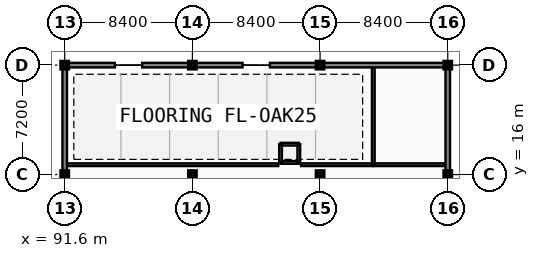
"""IFC4 building model, lengths in metres.
Left out: names, types, materials, properties, quantities, classifications, styles, units other than length and angle.
Written with IfcOpenShell. Run it as: python <this file> out.ifc"""

import sys

from ifc_helpers import new_model, si_unit, direction, frame, frame_2d, origin, origin_2d, place, context, subcontext, project, spatial, rectangle, extrude, element, fill, save


model = new_model("IFC4")
c1 = context("Model", 3, precision=1e-05, world=origin(), true_north=direction((0.0, 1.0)))
c2 = subcontext(c1, "Body", "Model", "MODEL_VIEW")
j1 = project(units=[si_unit("LENGTHUNIT", "METRE"), si_unit("PLANEANGLEUNIT", "RADIAN")], contexts=[c1])
p1 = place(None, origin())
s1 = spatial("IfcSite", under=j1, at=p1, CompositionType="ELEMENT")
p2 = place(p1, origin())
s2 = spatial("IfcBuilding", under=s1, at=p2, CompositionType="ELEMENT")
p3 = place(p2, frame((0.0, 0.0, 13.8)))
s3 = spatial("IfcBuildingStorey", under=s2, at=p3, CompositionType="ELEMENT", Elevation=13.8)
for number, where, z_axis, x_axis in (
    (1, (91.6, 16.0, 0.0), (0.0, 0.0, 1.0), (1.0, 0.0, 0.0)),
    (2, (91.6, 23.2, 0.0), (0.0, 0.0, 1.0), (1.0, 0.0, 0.0)),
    (3, (100.0, 16.0, 0.0), (0.0, 0.0, 1.0), (1.0, 0.0, 0.0)),
    (4, (100.0, 23.2, 0.0), (0.0, 0.0, 1.0), (1.0, 0.0, 0.0)),
    (5, (108.4, 16.0, 0.0), (0.0, 0.0, 1.0), (1.0, 0.0, 0.0)),
    (6, (108.4, 23.2, 0.0), (0.0, 0.0, 1.0), (1.0, 0.0, 0.0)),
    (7, (116.8, 16.0, 0.0), (0.0, 0.0, 1.0), (1.0, 0.0, 0.0)),
    (8, (116.8, 23.2, 0.0), (0.0, 0.0, 1.0), (1.0, 0.0, 0.0)),
):
    element("IfcColumn", number, at=place(p3, frame(where, z_axis=z_axis, x_axis=x_axis)), inside=s3, PredefinedType="COLUMN", context=c2, shape_type="SweptSolid", body=[
        extrude(rectangle(XDim=0.4, YDim=0.4, at=origin_2d()), origin(), (0.0, 0.0, 1.0), 3.9),
    ])
p4 = place(p3, frame((91.74, 16.65, 0.0), z_axis=(0.0, 0.0, 1.0), x_axis=(1.0, 0.0, 0.0)))
e9 = element("IfcWall", 9, at=p4, inside=s3, PredefinedType="PARTITIONING", context=c2, shape_type="SweptSolid", body=[
    extrude(rectangle(XDim=13.91, YDim=0.18, at=frame_2d((6.955, 0.0))), origin(), (0.0, 0.0, 1.0), 3.09),
])
p5 = place(p4, frame((5.54, 0.0, -0.01)))
e10 = element("IfcOpeningElement", 10, at=p5, cuts=e9, PredefinedType="OPENING", context=c2, shape_type="SweptSolid", body=[
    extrude(rectangle(XDim=1.6, YDim=2.21, at=frame_2d((0.8, 1.105))), frame((0.0, 0.1, 0.0), z_axis=(0.0, -1.0, 0.0), x_axis=(1.0, 0.0, 0.0)), (0.0, 0.0, 1.0), 0.2),
])
p6 = place(p3, frame((107.15, 16.65, 0.0), z_axis=(0.0, 0.0, 1.0), x_axis=(1.0, 0.0, 0.0)))
e11 = element("IfcWall", 11, at=p6, inside=s3, PredefinedType="PARTITIONING", context=c2, shape_type="SweptSolid", body=[
    extrude(rectangle(XDim=4.75, YDim=0.18, at=frame_2d((2.375, 0.0))), origin(), (0.0, 0.0, 1.0), 3.09),
])
p7 = place(p3, frame((111.9, 16.65, 0.0), z_axis=(0.0, 0.0, 1.0), x_axis=(1.0, 0.0, 0.0)))
e12 = element("IfcWall", 12, at=p7, inside=s3, PredefinedType="PARTITIONING", context=c2, shape_type="SweptSolid", body=[
    extrude(rectangle(XDim=4.76, YDim=0.18, at=frame_2d((2.38, 0.0))), origin(), (0.0, 0.0, 1.0), 3.09),
])
p8 = place(p7, frame((1.88, 0.0, -0.01)))
e13 = element("IfcOpeningElement", 13, at=p8, cuts=e12, PredefinedType="OPENING", context=c2, shape_type="SweptSolid", body=[
    extrude(rectangle(XDim=1.0, YDim=2.16, at=frame_2d((0.5, 1.08))), frame((0.0, 0.1, 0.0), z_axis=(0.0, -1.0, 0.0), x_axis=(1.0, 0.0, 0.0)), (0.0, 0.0, 1.0), 0.2),
])
p9 = place(p3, frame((111.9, 16.65, 0.0), z_axis=(0.0, 0.0, 1.0), x_axis=(0.0, 1.0, 0.0)))
e14 = element("IfcWall", 14, at=p9, inside=s3, PredefinedType="PARTITIONING", context=c2, shape_type="SweptSolid", body=[
    extrude(rectangle(XDim=6.41, YDim=0.18, at=frame_2d((3.205, 0.0))), origin(), (0.0, 0.0, 1.0), 3.01),
])
p10 = place(p3, frame((100.0, 23.2, 0.0), z_axis=(0.0, 0.0, 1.0), x_axis=(-1.0, 0.0, 0.0)))
e15 = element("IfcWall", 15, at=p10, inside=s3, PredefinedType="SOLIDWALL", context=c2, shape_type="SweptSolid", body=[
    extrude(rectangle(XDim=3.3, YDim=0.3, at=frame_2d((1.65, 0.0))), origin(), (0.0, 0.0, 1.0), 3.01),
])
for number, where, z_axis, x_axis in (
    (16, (94.9, 23.2, 0.0), (0.0, 0.0, 1.0), (-1.0, 0.0, 0.0)),
    (17, (108.4, 23.2, 0.0), (0.0, 0.0, 1.0), (-1.0, 0.0, 0.0)),
):
    element("IfcWall", number, at=place(p3, frame(where, z_axis=z_axis, x_axis=x_axis)), inside=s3, PredefinedType="SOLIDWALL", context=c2, shape_type="SweptSolid", body=[
        extrude(rectangle(XDim=3.3, YDim=0.3, at=frame_2d((1.65, 0.0))), origin(), (0.0, 0.0, 1.0), 3.01),
    ])
p11 = place(p3, frame((103.3, 23.2, 0.0), z_axis=(0.0, 0.0, 1.0), x_axis=(-1.0, 0.0, 0.0)))
e18 = element("IfcWall", 18, at=p11, inside=s3, PredefinedType="SOLIDWALL", context=c2, shape_type="SweptSolid", body=[
    extrude(rectangle(XDim=3.3, YDim=0.3, at=frame_2d((1.65, 0.0))), origin(), (0.0, 0.0, 1.0), 3.01),
])
p12 = place(p3, frame((116.8, 23.2, 0.0), z_axis=(0.0, 0.0, 1.0), x_axis=(-1.0, 0.0, 0.0)))
e19 = element("IfcWall", 19, at=p12, inside=s3, PredefinedType="SOLIDWALL", context=c2, shape_type="SweptSolid", body=[
    extrude(rectangle(XDim=8.4, YDim=0.3, at=frame_2d((4.2, 0.0))), origin(), (0.0, 0.0, 1.0), 3.01),
])
p13 = place(p12, frame((0.46, 0.0, 0.85)))
e20 = element("IfcOpeningElement", 20, at=p13, cuts=e19, PredefinedType="OPENING", context=c2, shape_type="SweptSolid", body=[
    extrude(rectangle(XDim=0.9, YDim=2.02, at=frame_2d((0.45, 1.01))), frame((0.0, 0.16, 0.0), z_axis=(0.0, -1.0, 0.0), x_axis=(1.0, 0.0, 0.0)), (0.0, 0.0, 1.0), 0.32),
])
p14 = place(p12, frame((6.86, 0.0, 0.85)))
e21 = element("IfcOpeningElement", 21, at=p14, cuts=e19, PredefinedType="OPENING", context=c2, shape_type="SweptSolid", body=[
    extrude(rectangle(XDim=0.9, YDim=2.02, at=frame_2d((0.45, 1.01))), frame((0.0, 0.16, 0.0), z_axis=(0.0, -1.0, 0.0), x_axis=(1.0, 0.0, 0.0)), (0.0, 0.0, 1.0), 0.32),
])
p15 = place(p3, frame((91.6, 16.0, 0.0), z_axis=(0.0, 0.0, 1.0), x_axis=(0.0, -1.0, 0.0)))
e22 = element("IfcWall", 22, at=p15, inside=s3, PredefinedType="SOLIDWALL", context=c2, shape_type="SweptSolid", body=[
    extrude(rectangle(XDim=2.7, YDim=0.3, at=frame_2d((1.35, 0.0))), origin(), (0.0, 0.0, 1.0), 3.01),
])
p16 = place(p3, frame((91.6, 23.2, 0.0), z_axis=(0.0, 0.0, 1.0), x_axis=(0.0, -1.0, 0.0)))
e23 = element("IfcWall", 23, at=p16, inside=s3, PredefinedType="SOLIDWALL", context=c2, shape_type="SweptSolid", body=[
    extrude(rectangle(XDim=7.2, YDim=0.3, at=frame_2d((3.6, 0.0))), origin(), (0.0, 0.0, 1.0), 3.01),
])
p17 = place(p16, frame((0.46, 0.0, 0.85)))
e24 = element("IfcOpeningElement", 24, at=p17, cuts=e23, PredefinedType="OPENING", context=c2, shape_type="SweptSolid", body=[
    extrude(rectangle(XDim=0.9, YDim=2.02, at=frame_2d((0.45, 1.01))), frame((0.0, 0.16, 0.0), z_axis=(0.0, -1.0, 0.0), x_axis=(1.0, 0.0, 0.0)), (0.0, 0.0, 1.0), 0.32),
])
p18 = place(p16, frame((5.26, 0.0, 0.85)))
e25 = element("IfcOpeningElement", 25, at=p18, cuts=e23, PredefinedType="OPENING", context=c2, shape_type="SweptSolid", body=[
    extrude(rectangle(XDim=0.9, YDim=2.02, at=frame_2d((0.45, 1.01))), frame((0.0, 0.16, 0.0), z_axis=(0.0, -1.0, 0.0), x_axis=(1.0, 0.0, 0.0)), (0.0, 0.0, 1.0), 0.32),
])
p19 = place(p3, frame((116.8, 8.8, 0.0), z_axis=(0.0, 0.0, 1.0), x_axis=(0.0, 1.0, 0.0)))
e26 = element("IfcWall", 26, at=p19, inside=s3, PredefinedType="SOLIDWALL", context=c2, shape_type="SweptSolid", body=[
    extrude(rectangle(XDim=7.2, YDim=0.3, at=frame_2d((3.6, 0.0))), origin(), (0.0, 0.0, 1.0), 3.01),
])
p20 = place(p19, frame((0.46, 0.0, 0.85)))
e27 = element("IfcOpeningElement", 27, at=p20, cuts=e26, PredefinedType="OPENING", context=c2, shape_type="SweptSolid", body=[
    extrude(rectangle(XDim=0.9, YDim=2.02, at=frame_2d((0.45, 1.01))), frame((0.0, 0.16, 0.0), z_axis=(0.0, -1.0, 0.0), x_axis=(1.0, 0.0, 0.0)), (0.0, 0.0, 1.0), 0.32),
])
p21 = place(p19, frame((5.66, 0.0, 0.85)))
e28 = element("IfcOpeningElement", 28, at=p21, cuts=e26, PredefinedType="OPENING", context=c2, shape_type="SweptSolid", body=[
    extrude(rectangle(XDim=0.9, YDim=2.02, at=frame_2d((0.45, 1.01))), frame((0.0, 0.16, 0.0), z_axis=(0.0, -1.0, 0.0), x_axis=(1.0, 0.0, 0.0)), (0.0, 0.0, 1.0), 0.32),
])
p22 = place(p3, frame((116.8, 16.0, 0.0), z_axis=(0.0, 0.0, 1.0), x_axis=(0.0, 1.0, 0.0)))
e29 = element("IfcWall", 29, at=p22, inside=s3, PredefinedType="SOLIDWALL", context=c2, shape_type="SweptSolid", body=[
    extrude(rectangle(XDim=7.2, YDim=0.3, at=frame_2d((3.6, 0.0))), origin(), (0.0, 0.0, 1.0), 3.01),
])
p23 = place(p22, frame((0.86, 0.0, 0.85)))
e30 = element("IfcOpeningElement", 30, at=p23, cuts=e29, PredefinedType="OPENING", context=c2, shape_type="SweptSolid", body=[
    extrude(rectangle(XDim=0.9, YDim=2.02, at=frame_2d((0.45, 1.01))), frame((0.0, 0.16, 0.0), z_axis=(0.0, -1.0, 0.0), x_axis=(1.0, 0.0, 0.0)), (0.0, 0.0, 1.0), 0.32),
])
p24 = place(p22, frame((5.66, 0.0, 0.85)))
e31 = element("IfcOpeningElement", 31, at=p24, cuts=e29, PredefinedType="OPENING", context=c2, shape_type="SweptSolid", body=[
    extrude(rectangle(XDim=0.9, YDim=2.02, at=frame_2d((0.45, 1.01))), frame((0.0, 0.16, 0.0), z_axis=(0.0, -1.0, 0.0), x_axis=(1.0, 0.0, 0.0)), (0.0, 0.0, 1.0), 0.32),
])
p25 = place(p3, frame((105.8, 16.8, 0.0), z_axis=(0.0, 0.0, 1.0), x_axis=(1.0, 0.0, 0.0)))
e32 = element("IfcWall", 32, at=p25, inside=s3, PredefinedType="SOLIDWALL", context=c2, shape_type="SweptSolid", body=[
    extrude(rectangle(XDim=1.2, YDim=0.18, at=frame_2d((0.6, 0.0))), origin(), (0.0, 0.0, 1.0), 3.69),
])
p26 = place(p25, frame((0.2, 0.0, -0.01)))
e33 = element("IfcOpeningElement", 33, at=p26, cuts=e32, PredefinedType="OPENING", context=c2, shape_type="SweptSolid", body=[
    extrude(rectangle(XDim=0.8, YDim=2.06, at=frame_2d((0.4, 1.03))), frame((0.0, 0.1, 0.0), z_axis=(0.0, -1.0, 0.0), x_axis=(1.0, 0.0, 0.0)), (0.0, 0.0, 1.0), 0.2),
])
for number, where, z_axis, x_axis in (
    (34, (107.0, 16.8, 0.0), (0.0, 0.0, 1.0), (0.0, 1.0, 0.0)),
    (35, (107.0, 18.0, 0.0), (0.0, 0.0, 1.0), (-1.0, 0.0, 0.0)),
    (36, (105.8, 18.0, 0.0), (0.0, 0.0, 1.0), (0.0, -1.0, 0.0)),
):
    element("IfcWall", number, at=place(p3, frame(where, z_axis=z_axis, x_axis=x_axis)), inside=s3, PredefinedType="SOLIDWALL", context=c2, shape_type="SweptSolid", body=[
        extrude(rectangle(XDim=1.2, YDim=0.18, at=frame_2d((0.6, 0.0))), origin(), (0.0, 0.0, 1.0), 3.69),
    ])
p27 = place(p5, frame((0.0, 0.0, 0.01)))
e37 = element("IfcDoor", 37, at=p27, inside=s3, OperationType="DOUBLE_SWING_LEFT", PredefinedType="DOOR", context=c2, shape_type="SweptSolid", body=[
    extrude(rectangle(XDim=1.6, YDim=2.2, at=frame_2d((0.8, 1.1))), frame((0.0, 0.025, 0.0), z_axis=(0.0, -1.0, 0.0), x_axis=(1.0, 0.0, 0.0)), (0.0, 0.0, 1.0), 0.05),
])
fill(e10, e37)
p28 = place(p8, frame((0.0, 0.0, 0.01)))
e38 = element("IfcDoor", 38, at=p28, inside=s3, OperationType="SINGLE_SWING_LEFT", PredefinedType="DOOR", context=c2, shape_type="SweptSolid", body=[
    extrude(rectangle(XDim=1.0, YDim=2.15, at=frame_2d((0.5, 1.075))), frame((0.0, 0.025, 0.0), z_axis=(0.0, -1.0, 0.0), x_axis=(1.0, 0.0, 0.0)), (0.0, 0.0, 1.0), 0.05),
])
fill(e13, e38)
p29 = place(p13, origin())
e39 = element("IfcWindow", 39, at=p29, inside=s3, PartitioningType="SINGLE_PANEL", PredefinedType="WINDOW", context=c2, shape_type="SweptSolid", body=[
    extrude(rectangle(XDim=0.9, YDim=2.02, at=frame_2d((0.45, 1.01))), frame((0.0, 0.03, 0.0), z_axis=(0.0, -1.0, 0.0), x_axis=(1.0, 0.0, 0.0)), (0.0, 0.0, 1.0), 0.06),
])
fill(e20, e39)
p30 = place(p14, origin())
e40 = element("IfcWindow", 40, at=p30, inside=s3, PartitioningType="SINGLE_PANEL", PredefinedType="WINDOW", context=c2, shape_type="SweptSolid", body=[
    extrude(rectangle(XDim=0.9, YDim=2.02, at=frame_2d((0.45, 1.01))), frame((0.0, 0.03, 0.0), z_axis=(0.0, -1.0, 0.0), x_axis=(1.0, 0.0, 0.0)), (0.0, 0.0, 1.0), 0.06),
])
fill(e21, e40)
p31 = place(p17, origin())
e41 = element("IfcWindow", 41, at=p31, inside=s3, PartitioningType="SINGLE_PANEL", PredefinedType="WINDOW", context=c2, shape_type="SweptSolid", body=[
    extrude(rectangle(XDim=0.9, YDim=2.02, at=frame_2d((0.45, 1.01))), frame((0.0, 0.03, 0.0), z_axis=(0.0, -1.0, 0.0), x_axis=(1.0, 0.0, 0.0)), (0.0, 0.0, 1.0), 0.06),
])
fill(e24, e41)
p32 = place(p18, origin())
e42 = element("IfcWindow", 42, at=p32, inside=s3, PartitioningType="SINGLE_PANEL", PredefinedType="WINDOW", context=c2, shape_type="SweptSolid", body=[
    extrude(rectangle(XDim=0.9, YDim=2.02, at=frame_2d((0.45, 1.01))), frame((0.0, 0.03, 0.0), z_axis=(0.0, -1.0, 0.0), x_axis=(1.0, 0.0, 0.0)), (0.0, 0.0, 1.0), 0.06),
])
fill(e25, e42)
p33 = place(p23, origin())
e43 = element("IfcWindow", 43, at=p33, inside=s3, PartitioningType="SINGLE_PANEL", PredefinedType="WINDOW", context=c2, shape_type="SweptSolid", body=[
    extrude(rectangle(XDim=0.9, YDim=2.02, at=frame_2d((0.45, 1.01))), frame((0.0, 0.03, 0.0), z_axis=(0.0, -1.0, 0.0), x_axis=(1.0, 0.0, 0.0)), (0.0, 0.0, 1.0), 0.06),
])
fill(e30, e43)
p34 = place(p24, origin())
e44 = element("IfcWindow", 44, at=p34, inside=s3, PartitioningType="SINGLE_PANEL", PredefinedType="WINDOW", context=c2, shape_type="SweptSolid", body=[
    extrude(rectangle(XDim=0.9, YDim=2.02, at=frame_2d((0.45, 1.01))), frame((0.0, 0.03, 0.0), z_axis=(0.0, -1.0, 0.0), x_axis=(1.0, 0.0, 0.0)), (0.0, 0.0, 1.0), 0.06),
])
fill(e31, e44)
p35 = place(p26, frame((0.0, 0.0, 0.01)))
e45 = element("IfcDoor", 45, at=p35, inside=s3, OperationType="SINGLE_SWING_LEFT", PredefinedType="DOOR", context=c2, shape_type="SweptSolid", body=[
    extrude(rectangle(XDim=0.8, YDim=2.05, at=frame_2d((0.4, 1.025))), frame((0.0, 0.025, 0.0), z_axis=(0.0, -1.0, 0.0), x_axis=(1.0, 0.0, 0.0)), (0.0, 0.0, 1.0), 0.05),
])
fill(e33, e45)
save(model, sys.argv[1])
